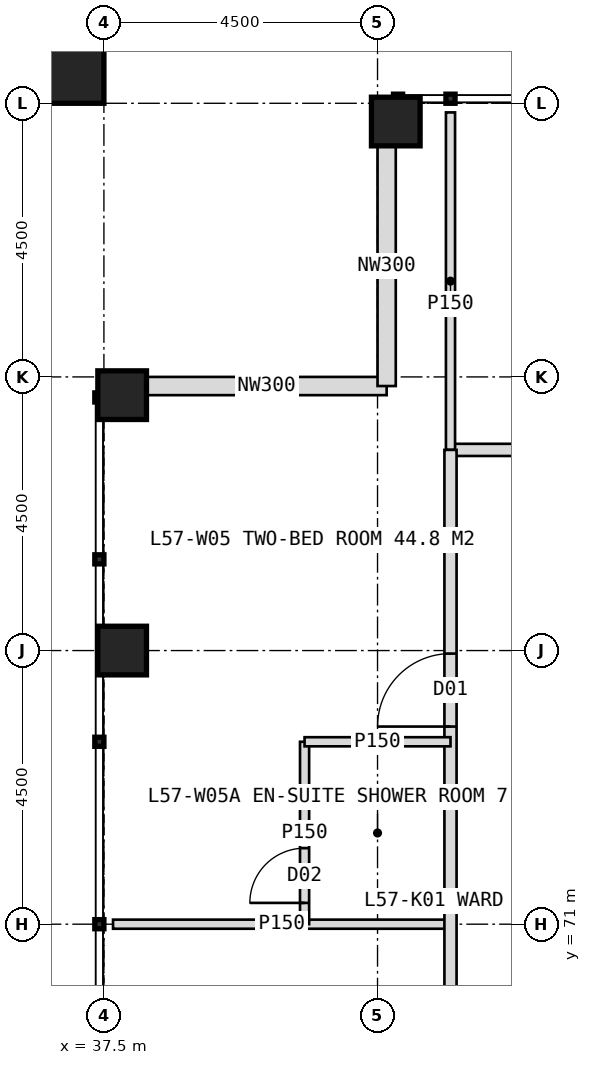
"""IFC4 building model, lengths in metres.
Left out: names, types, materials, properties, quantities, classifications, styles, units other than length and angle.
Written with IfcOpenShell. Run it as: python <this file> out.ifc"""

import sys

from ifc_helpers import new_model, si_unit, direction, frame, frame_2d, origin, origin_2d, place, context, subcontext, project, spatial, rectangle, hollow_rectangle, extrude, element, fill, save


model = new_model("IFC4")
c1 = context("Model", 3, precision=1e-05, world=origin(), true_north=direction((0.0, 1.0)))
c2 = subcontext(c1, "Body", "Model", "MODEL_VIEW")
j1 = project(units=[si_unit("LENGTHUNIT", "METRE"), si_unit("PLANEANGLEUNIT", "RADIAN")], contexts=[c1])
p1 = place(None, origin())
s1 = spatial("IfcSite", under=j1, at=p1, CompositionType="ELEMENT")
p2 = place(p1, origin())
s2 = spatial("IfcBuilding", under=s1, at=p2, CompositionType="ELEMENT")
p3 = place(p2, frame((0.0, 0.0, 237.0)))
s3 = spatial("IfcBuildingStorey", under=s2, at=p3, CompositionType="ELEMENT", Elevation=237.0)
for number, where, z_axis, x_axis in (
    (1, (42.3, 84.2, 0.0), (0.0, 0.0, 1.0), (1.0, 0.0, 0.0)),
    (2, (37.8, 75.5, 0.0), (0.0, 0.0, 1.0), (1.0, 0.0, 0.0)),
    (3, (37.8, 79.7, 0.0), (0.0, 0.0, 1.0), (1.0, 0.0, 0.0)),
):
    element("IfcColumn", number, at=place(p3, frame(where, z_axis=z_axis, x_axis=x_axis)), inside=s3, PredefinedType="COLUMN", context=c2, shape_type="SweptSolid", body=[
        extrude(hollow_rectangle(XDim=0.8, YDim=0.8, WallThickness=0.08, at=origin_2d()), origin(), (0.0, 0.0, 1.0), 4.0),
    ])
p4 = place(p3, frame((36.9, 85.1, 0.0), z_axis=(0.0, 0.0, 1.0), x_axis=(1.0, 0.0, 0.0)))
e4 = element("IfcColumn", 4, at=p4, inside=s3, PredefinedType="COLUMN", context=c2, shape_type="SweptSolid", body=[
    extrude(hollow_rectangle(XDim=1.2, YDim=1.2, WallThickness=0.07, at=origin_2d()), origin(), (0.0, 0.0, 1.0), 4.0),
])
for number, where, z_axis, x_axis in (
    (5, (38.2, 79.85, 0.0), (0.0, 0.0, 1.0), (1.0, 0.0, 0.0)),
    (6, (42.15, 79.85, 0.0), (0.0, 0.0, 1.0), (0.0, 1.0, 0.0)),
):
    element("IfcWall", number, at=place(p3, frame(where, z_axis=z_axis, x_axis=x_axis)), inside=s3, PredefinedType="ELEMENTEDWALL", context=c2, shape_type="SweptSolid", body=[
        extrude(rectangle(XDim=3.95, YDim=0.3, at=frame_2d((1.975, 0.0))), origin(), (0.0, 0.0, 1.0), 2.85),
    ])
p5 = place(p3, frame((43.2, 78.8, 0.0), z_axis=(0.0, 0.0, 1.0), x_axis=(1.0, 0.0, 0.0)))
e7 = element("IfcWall", 7, at=p5, inside=s3, PredefinedType="PARTITIONING", context=c2, shape_type="SweptSolid", body=[
    extrude(rectangle(XDim=33.6, YDim=0.2, at=frame_2d((16.8, 0.0))), origin(), (0.0, 0.0, 1.0), 3.75),
])
p6 = place(p5, frame((3.4, 0.0, 0.0)))
e8 = element("IfcOpeningElement", 8, at=p6, cuts=e7, PredefinedType="OPENING", context=c2, shape_type="SweptSolid", body=[
    extrude(rectangle(XDim=1.0, YDim=2.1, at=frame_2d((0.5, 1.05))), frame((0.0, 0.11, 0.0), z_axis=(0.0, -1.0, 0.0), x_axis=(1.0, 0.0, 0.0)), (0.0, 0.0, 1.0), 0.22),
])
p7 = place(p5, frame((11.05, 0.0, 0.0)))
e9 = element("IfcOpeningElement", 9, at=p7, cuts=e7, PredefinedType="OPENING", context=c2, shape_type="SweptSolid", body=[
    extrude(rectangle(XDim=1.2, YDim=2.2, at=frame_2d((0.6, 1.1))), frame((0.0, 0.11, 0.0), z_axis=(0.0, -1.0, 0.0), x_axis=(1.0, 0.0, 0.0)), (0.0, 0.0, 1.0), 0.22),
])
p8 = place(p5, frame((20.05, 0.0, 0.0)))
e10 = element("IfcOpeningElement", 10, at=p8, cuts=e7, PredefinedType="OPENING", context=c2, shape_type="SweptSolid", body=[
    extrude(rectangle(XDim=1.2, YDim=2.2, at=frame_2d((0.6, 1.1))), frame((0.0, 0.11, 0.0), z_axis=(0.0, -1.0, 0.0), x_axis=(1.0, 0.0, 0.0)), (0.0, 0.0, 1.0), 0.22),
])
p9 = place(p5, frame((29.05, 0.0, 0.0)))
e11 = element("IfcOpeningElement", 11, at=p9, cuts=e7, PredefinedType="OPENING", context=c2, shape_type="SweptSolid", body=[
    extrude(rectangle(XDim=1.2, YDim=2.2, at=frame_2d((0.6, 1.1))), frame((0.0, 0.11, 0.0), z_axis=(0.0, -1.0, 0.0), x_axis=(1.0, 0.0, 0.0)), (0.0, 0.0, 1.0), 0.22),
])
for number, where, z_axis, x_axis in (
    (12, (43.2, 78.8, 0.0), (0.0, 0.0, 1.0), (0.0, 1.0, 0.0)),
    (13, (43.2, 71.0, 0.0), (0.0, 0.0, 1.0), (-1.0, 0.0, 0.0)),
):
    element("IfcWall", number, at=place(p3, frame(where, z_axis=z_axis, x_axis=x_axis)), inside=s3, PredefinedType="PARTITIONING", context=c2, shape_type="SweptSolid", body=[
        extrude(rectangle(XDim=5.55, YDim=0.15, at=frame_2d((2.775, 0.0))), origin(), (0.0, 0.0, 1.0), 3.75),
    ])
p10 = place(p3, frame((43.2, 45.2, 0.0), z_axis=(0.0, 0.0, 1.0), x_axis=(0.0, 1.0, 0.0)))
e14 = element("IfcWall", 14, at=p10, inside=s3, PredefinedType="PARTITIONING", context=c2, shape_type="SweptSolid", body=[
    extrude(rectangle(XDim=33.6, YDim=0.2, at=frame_2d((16.8, 0.0))), origin(), (0.0, 0.0, 1.0), 3.75),
])
p11 = place(p10, frame((2.65, 0.0, 0.0)))
e15 = element("IfcOpeningElement", 15, at=p11, cuts=e14, PredefinedType="OPENING", context=c2, shape_type="SweptSolid", body=[
    extrude(rectangle(XDim=1.2, YDim=2.2, at=frame_2d((0.6, 1.1))), frame((0.0, 0.11, 0.0), z_axis=(0.0, -1.0, 0.0), x_axis=(1.0, 0.0, 0.0)), (0.0, 0.0, 1.0), 0.22),
])
p12 = place(p10, frame((7.45, 0.0, 0.0)))
e16 = element("IfcOpeningElement", 16, at=p12, cuts=e14, PredefinedType="OPENING", context=c2, shape_type="SweptSolid", body=[
    extrude(rectangle(XDim=1.2, YDim=2.2, at=frame_2d((0.6, 1.1))), frame((0.0, 0.11, 0.0), z_axis=(0.0, -1.0, 0.0), x_axis=(1.0, 0.0, 0.0)), (0.0, 0.0, 1.0), 0.22),
])
p13 = place(p10, frame((13.45, 0.0, 0.0)))
e17 = element("IfcOpeningElement", 17, at=p13, cuts=e14, PredefinedType="OPENING", context=c2, shape_type="SweptSolid", body=[
    extrude(rectangle(XDim=1.2, YDim=2.2, at=frame_2d((0.6, 1.1))), frame((0.0, 0.11, 0.0), z_axis=(0.0, -1.0, 0.0), x_axis=(1.0, 0.0, 0.0)), (0.0, 0.0, 1.0), 0.22),
])
p14 = place(p10, frame((20.05, 0.0, 0.0)))
e18 = element("IfcOpeningElement", 18, at=p14, cuts=e14, PredefinedType="OPENING", context=c2, shape_type="SweptSolid", body=[
    extrude(rectangle(XDim=1.2, YDim=2.2, at=frame_2d((0.6, 1.1))), frame((0.0, 0.11, 0.0), z_axis=(0.0, -1.0, 0.0), x_axis=(1.0, 0.0, 0.0)), (0.0, 0.0, 1.0), 0.22),
])
p15 = place(p10, frame((29.05, 0.0, 0.0)))
e19 = element("IfcOpeningElement", 19, at=p15, cuts=e14, PredefinedType="OPENING", context=c2, shape_type="SweptSolid", body=[
    extrude(rectangle(XDim=1.2, YDim=2.2, at=frame_2d((0.6, 1.1))), frame((0.0, 0.11, 0.0), z_axis=(0.0, -1.0, 0.0), x_axis=(1.0, 0.0, 0.0)), (0.0, 0.0, 1.0), 0.22),
])
p16 = place(p3, frame((40.8, 71.0, 0.0), z_axis=(0.0, 0.0, 1.0), x_axis=(0.0, 1.0, 0.0)))
e20 = element("IfcWall", 20, at=p16, inside=s3, PredefinedType="PARTITIONING", context=c2, shape_type="SweptSolid", body=[
    extrude(rectangle(XDim=3.0, YDim=0.15, at=frame_2d((1.5, 0.0))), origin(), (0.0, 0.0, 1.0), 3.75),
])
p17 = place(p16, frame((0.35, 0.0, 0.0)))
e21 = element("IfcOpeningElement", 21, at=p17, cuts=e20, PredefinedType="OPENING", context=c2, shape_type="SweptSolid", body=[
    extrude(rectangle(XDim=0.9, YDim=2.1, at=frame_2d((0.45, 1.05))), frame((0.0, 0.085, 0.0), z_axis=(0.0, -1.0, 0.0), x_axis=(1.0, 0.0, 0.0)), (0.0, 0.0, 1.0), 0.17),
])
p18 = place(p3, frame((43.2, 74.0, 0.0), z_axis=(0.0, 0.0, 1.0), x_axis=(-1.0, 0.0, 0.0)))
e22 = element("IfcWall", 22, at=p18, inside=s3, PredefinedType="PARTITIONING", context=c2, shape_type="SweptSolid", body=[
    extrude(rectangle(XDim=2.4, YDim=0.15, at=frame_2d((1.2, 0.0))), origin(), (0.0, 0.0, 1.0), 3.75),
])
p19 = place(p15, origin())
e23 = element("IfcDoor", 23, at=p19, inside=s3, OperationType="SINGLE_SWING_LEFT", PredefinedType="DOOR", context=c2, shape_type="SweptSolid", body=[
    extrude(rectangle(XDim=1.2, YDim=2.2, at=frame_2d((0.6, 1.1))), frame((0.0, 0.025, 0.0), z_axis=(0.0, -1.0, 0.0), x_axis=(1.0, 0.0, 0.0)), (0.0, 0.0, 1.0), 0.05),
])
fill(e19, e23)
p20 = place(p17, origin())
e24 = element("IfcDoor", 24, at=p20, inside=s3, OperationType="SINGLE_SWING_LEFT", PredefinedType="DOOR", context=c2, shape_type="SweptSolid", body=[
    extrude(rectangle(XDim=0.9, YDim=2.1, at=frame_2d((0.45, 1.05))), frame((0.0, 0.025, 0.0), z_axis=(0.0, -1.0, 0.0), x_axis=(1.0, 0.0, 0.0)), (0.0, 0.0, 1.0), 0.05),
])
fill(e21, e24)
save(model, sys.argv[1])
